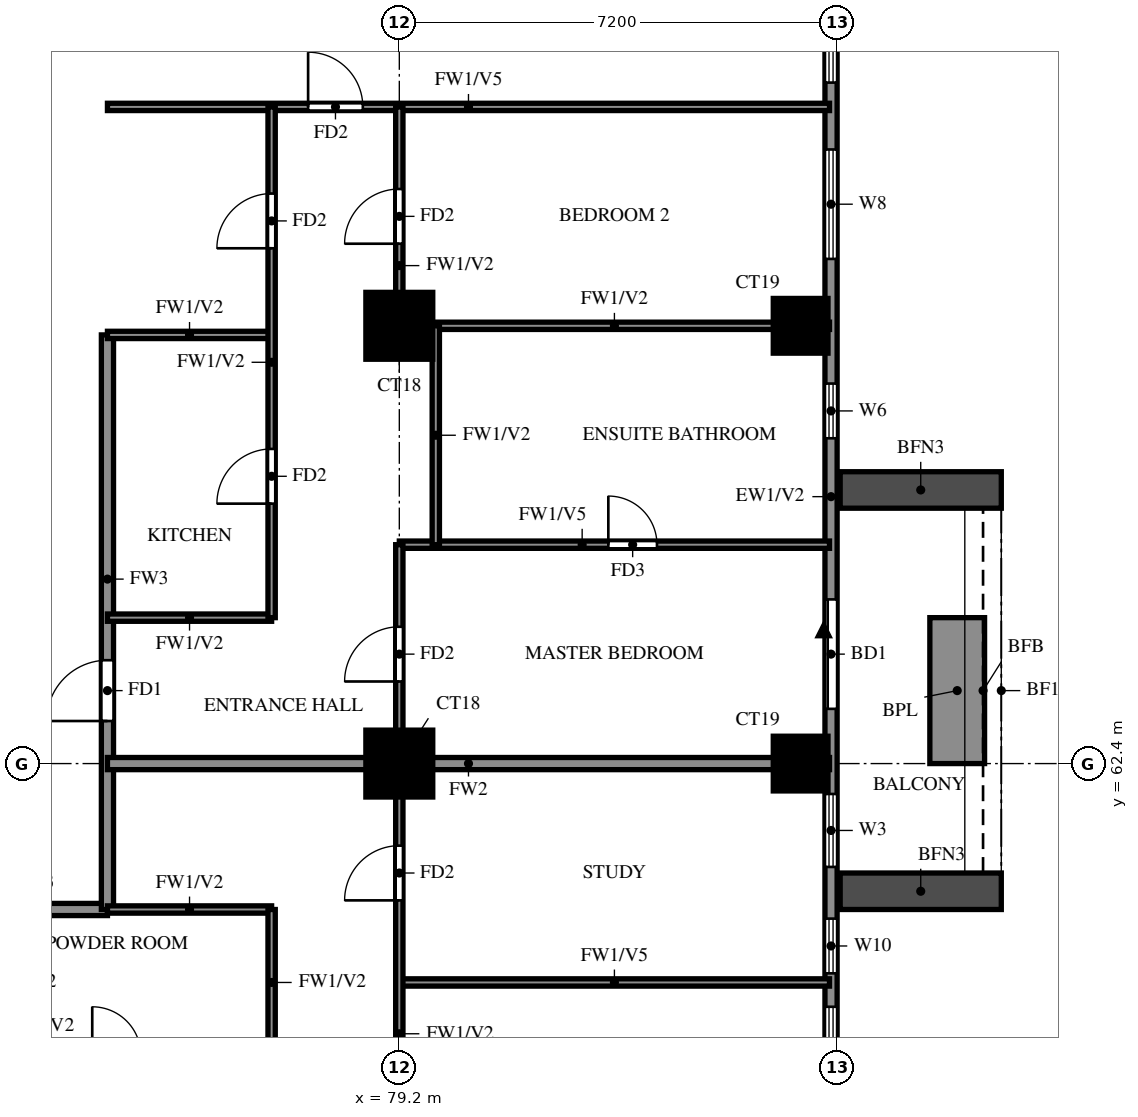
"""IFC4 building model, lengths in metres.
Left out: names, types, materials, properties, quantities, classifications, styles, units other than length and angle.
Written with IfcOpenShell. Run it as: python <this file> out.ifc"""

import sys

from ifc_helpers import new_model, si_unit, direction, frame, frame_2d, origin, origin_2d, place, context, subcontext, project, spatial, rectangle, extrude, source, transform, mapped, element, fill, save


model = new_model("IFC4")
c1 = context("Model", 3, precision=1e-05, world=origin(), true_north=direction((0.0, 1.0)))
c2 = subcontext(c1, "Body", "Model", "MODEL_VIEW")
j1 = project(units=[si_unit("LENGTHUNIT", "METRE"), si_unit("PLANEANGLEUNIT", "RADIAN")], contexts=[c1])
p1 = place(None, origin())
s1 = spatial("IfcSite", under=j1, at=p1, CompositionType="ELEMENT")
p2 = place(p1, origin())
s2 = spatial("IfcBuilding", under=s1, at=p2, CompositionType="ELEMENT")
p3 = place(p2, frame((0.0, 0.0, 130.5)))
s3 = spatial("IfcBuildingStorey", under=s2, at=p3, CompositionType="ELEMENT", Elevation=130.5)
m1 = source(origin(), c2, "Body", "SweptSolid", [
    extrude(rectangle(XDim=1.1, YDim=1.1, at=origin_2d()), origin(), (0.0, 0.0, 1.0), 3.2),
])
p4 = place(p3, frame((79.2, 62.4, 0.0), z_axis=(0.0, 0.0, 1.0), x_axis=(1.0, 0.0, 0.0)))
e1 = element("IfcColumn", 1, at=p4, inside=s3, PredefinedType="COLUMN", context=c2, shape_type="MappedRepresentation", body=[
    mapped(m1, transform((0.0, 0.0, 0.0))),
])
m2 = source(origin(), c2, "Body", "SweptSolid", [
    extrude(rectangle(XDim=0.9, YDim=0.9, at=origin_2d()), origin(), (0.0, 0.0, 1.0), 3.2),
])
p5 = place(p3, frame((85.8, 62.4, 0.0), z_axis=(0.0, 0.0, 1.0), x_axis=(1.0, 0.0, 0.0)))
e2 = element("IfcColumn", 2, at=p5, inside=s3, PredefinedType="COLUMN", context=c2, shape_type="MappedRepresentation", body=[
    mapped(m2, transform((0.0, 0.0, 0.0))),
])
p6 = place(p3, frame((79.2, 69.6, 0.0), z_axis=(0.0, 0.0, 1.0), x_axis=(1.0, 0.0, 0.0)))
e3 = element("IfcColumn", 3, at=p6, inside=s3, PredefinedType="COLUMN", context=c2, shape_type="MappedRepresentation", body=[
    mapped(m1, transform((0.0, 0.0, 0.0))),
])
p7 = place(p3, frame((85.8, 69.6, 0.0), z_axis=(0.0, 0.0, 1.0), x_axis=(1.0, 0.0, 0.0)))
e4 = element("IfcColumn", 4, at=p7, inside=s3, PredefinedType="COLUMN", context=c2, shape_type="MappedRepresentation", body=[
    mapped(m2, transform((0.0, 0.0, 0.0))),
])
p8 = place(p3, frame((86.3, 48.2, 0.0), z_axis=(0.0, 0.0, 1.0), x_axis=(0.0, 1.0, 0.0)))
e5 = element("IfcWall", 5, at=p8, inside=s3, PredefinedType="SOLIDWALL", context=c2, shape_type="SweptSolid", body=[
    extrude(rectangle(XDim=28.6, YDim=0.2, at=frame_2d((14.3, 0.0))), origin(), (0.0, 0.0, 1.0), 3.2),
])
p9 = place(p8, frame((15.1, 0.0, 0.0)))
e6 = element("IfcOpeningElement", 6, at=p9, cuts=e5, PredefinedType="OPENING", context=c2, shape_type="SweptSolid", body=[
    extrude(rectangle(XDim=1.8, YDim=2.4, at=frame_2d((0.9, 1.2))), frame((0.0, 0.11, 0.0), z_axis=(0.0, -1.0, 0.0), x_axis=(1.0, 0.0, 0.0)), (0.0, 0.0, 1.0), 0.22),
])
p10 = place(p8, frame((0.6, 0.0, 0.6)))
e7 = element("IfcOpeningElement", 7, at=p10, cuts=e5, PredefinedType="OPENING", context=c2, shape_type="SweptSolid", body=[
    extrude(rectangle(XDim=2.4, YDim=2.4, at=frame_2d((1.2, 1.2))), frame((0.0, 0.11, 0.0), z_axis=(0.0, -1.0, 0.0), x_axis=(1.0, 0.0, 0.0)), (0.0, 0.0, 1.0), 0.22),
])
p11 = place(p8, frame((3.8, 0.0, 0.6)))
e8 = element("IfcOpeningElement", 8, at=p11, cuts=e5, PredefinedType="OPENING", context=c2, shape_type="SweptSolid", body=[
    extrude(rectangle(XDim=2.4, YDim=2.4, at=frame_2d((1.2, 1.2))), frame((0.0, 0.11, 0.0), z_axis=(0.0, -1.0, 0.0), x_axis=(1.0, 0.0, 0.0)), (0.0, 0.0, 1.0), 0.22),
])
p12 = place(p8, frame((7.8, 0.0, 0.6)))
e9 = element("IfcOpeningElement", 9, at=p12, cuts=e5, PredefinedType="OPENING", context=c2, shape_type="SweptSolid", body=[
    extrude(rectangle(XDim=2.4, YDim=2.4, at=frame_2d((1.2, 1.2))), frame((0.0, 0.11, 0.0), z_axis=(0.0, -1.0, 0.0), x_axis=(1.0, 0.0, 0.0)), (0.0, 0.0, 1.0), 0.22),
])
p13 = place(p8, frame((10.75, 0.0, 0.6)))
e10 = element("IfcOpeningElement", 10, at=p13, cuts=e5, PredefinedType="OPENING", context=c2, shape_type="SweptSolid", body=[
    extrude(rectangle(XDim=0.9, YDim=2.4, at=frame_2d((0.45, 1.2))), frame((0.0, 0.11, 0.0), z_axis=(0.0, -1.0, 0.0), x_axis=(1.0, 0.0, 0.0)), (0.0, 0.0, 1.0), 0.22),
])
p14 = place(p8, frame((12.5, 0.0, 0.6)))
e11 = element("IfcOpeningElement", 11, at=p14, cuts=e5, PredefinedType="OPENING", context=c2, shape_type="SweptSolid", body=[
    extrude(rectangle(XDim=1.2, YDim=2.4, at=frame_2d((0.6, 1.2))), frame((0.0, 0.11, 0.0), z_axis=(0.0, -1.0, 0.0), x_axis=(1.0, 0.0, 0.0)), (0.0, 0.0, 1.0), 0.22),
])
p15 = place(p8, frame((19.55, 0.0, 1.5)))
e12 = element("IfcOpeningElement", 12, at=p15, cuts=e5, PredefinedType="OPENING", context=c2, shape_type="SweptSolid", body=[
    extrude(rectangle(XDim=0.9, YDim=0.9, at=frame_2d((0.45, 0.45))), frame((0.0, 0.11, 0.0), z_axis=(0.0, -1.0, 0.0), x_axis=(1.0, 0.0, 0.0)), (0.0, 0.0, 1.0), 0.22),
])
p16 = place(p8, frame((22.5, 0.0, 0.6)))
e13 = element("IfcOpeningElement", 13, at=p16, cuts=e5, PredefinedType="OPENING", context=c2, shape_type="SweptSolid", body=[
    extrude(rectangle(XDim=1.8, YDim=2.4, at=frame_2d((0.9, 1.2))), frame((0.0, 0.11, 0.0), z_axis=(0.0, -1.0, 0.0), x_axis=(1.0, 0.0, 0.0)), (0.0, 0.0, 1.0), 0.22),
])
p17 = place(p8, frame((25.4, 0.0, 0.6)))
e14 = element("IfcOpeningElement", 14, at=p17, cuts=e5, PredefinedType="OPENING", context=c2, shape_type="SweptSolid", body=[
    extrude(rectangle(XDim=2.4, YDim=2.4, at=frame_2d((1.2, 1.2))), frame((0.0, 0.11, 0.0), z_axis=(0.0, -1.0, 0.0), x_axis=(1.0, 0.0, 0.0)), (0.0, 0.0, 1.0), 0.22),
])
for number, where, z_axis, x_axis in (
    (15, (86.45, 60.3, 0.0), (0.0, 0.0, 1.0), (1.0, 0.0, 0.0)),
    (16, (86.45, 66.9, 0.0), (0.0, 0.0, 1.0), (1.0, 0.0, 0.0)),
):
    element("IfcWall", number, at=place(p3, frame(where, z_axis=z_axis, x_axis=x_axis)), inside=s3, PredefinedType="SOLIDWALL", context=c2, shape_type="SweptSolid", body=[
        extrude(rectangle(XDim=2.65, YDim=0.6, at=frame_2d((1.325, 0.0))), origin(), (0.0, 0.0, 1.0), 2.85),
    ])
p18 = place(p3, frame((88.375, 62.4, 0.0), z_axis=(0.0, 0.0, 1.0), x_axis=(0.0, 1.0, 0.0)))
e17 = element("IfcWall", 17, at=p18, inside=s3, PredefinedType="SOLIDWALL", context=c2, shape_type="SweptSolid", body=[
    extrude(rectangle(XDim=2.4, YDim=0.9, at=frame_2d((1.2, 0.0))), origin(), (0.0, 0.0, 1.0), 0.9),
])
p19 = place(p3, frame((72.0, 60.0, 0.0), z_axis=(0.0, 0.0, 1.0), x_axis=(1.0, 0.0, 0.0)))
e18 = element("IfcWall", 18, at=p19, inside=s3, PredefinedType="SOLIDWALL", context=c2, shape_type="SweptSolid", body=[
    extrude(rectangle(XDim=2.4, YDim=0.2, at=frame_2d((1.2, 0.0))), origin(), (0.0, 0.0, 1.0), 3.2),
])
p20 = place(p3, frame((74.4, 60.0, 0.0), z_axis=(0.0, 0.0, 1.0), x_axis=(0.0, 1.0, 0.0)))
e19 = element("IfcWall", 19, at=p20, inside=s3, PredefinedType="SOLIDWALL", context=c2, shape_type="SweptSolid", body=[
    extrude(rectangle(XDim=9.45, YDim=0.2, at=frame_2d((4.725, 0.0))), origin(), (0.0, 0.0, 1.0), 3.2),
])
p21 = place(p20, frame((3.1, 0.0, 0.0)))
e20 = element("IfcOpeningElement", 20, at=p21, cuts=e19, PredefinedType="OPENING", context=c2, shape_type="SweptSolid", body=[
    extrude(rectangle(XDim=1.0, YDim=2.1, at=frame_2d((0.5, 1.05))), frame((0.0, 0.11, 0.0), z_axis=(0.0, -1.0, 0.0), x_axis=(1.0, 0.0, 0.0)), (0.0, 0.0, 1.0), 0.22),
])
p22 = place(p3, frame((74.4, 62.4, 0.0), z_axis=(0.0, 0.0, 1.0), x_axis=(1.0, 0.0, 0.0)))
e21 = element("IfcWall", 21, at=p22, inside=s3, PredefinedType="SOLIDWALL", context=c2, shape_type="SweptSolid", body=[
    extrude(rectangle(XDim=11.875, YDim=0.2, at=frame_2d((5.938, 0.0))), origin(), (0.0, 0.0, 1.0), 3.2),
])
p23 = place(p3, frame((79.2, 58.8, 0.0), z_axis=(0.0, 0.0, 1.0), x_axis=(1.0, 0.0, 0.0)))
e22 = element("IfcWall", 22, at=p23, inside=s3, PredefinedType="PARTITIONING", context=c2, shape_type="SweptSolid", body=[
    extrude(rectangle(XDim=7.075, YDim=0.12, at=frame_2d((3.538, 0.0))), origin(), (0.0, 0.0, 1.0), 2.3),
])
for number, where, z_axis, x_axis in (
    (23, (74.4, 60.0, 0.0), (0.0, 0.0, 1.0), (1.0, 0.0, 0.0)),
    (24, (74.4, 64.8, 0.0), (0.0, 0.0, 1.0), (1.0, 0.0, 0.0)),
):
    element("IfcWall", number, at=place(p3, frame(where, z_axis=z_axis, x_axis=x_axis)), inside=s3, PredefinedType="PARTITIONING", context=c2, shape_type="SweptSolid", body=[
        extrude(rectangle(XDim=2.7, YDim=0.12, at=frame_2d((1.35, 0.0))), origin(), (0.0, 0.0, 1.0), 3.2),
    ])
p24 = place(p3, frame((79.2, 66.0, 0.0), z_axis=(0.0, 0.0, 1.0), x_axis=(1.0, 0.0, 0.0)))
e25 = element("IfcWall", 25, at=p24, inside=s3, PredefinedType="PARTITIONING", context=c2, shape_type="SweptSolid", body=[
    extrude(rectangle(XDim=7.075, YDim=0.12, at=frame_2d((3.538, 0.0))), origin(), (0.0, 0.0, 1.0), 2.3),
])
p25 = place(p24, frame((3.438, 0.0, 0.0)))
e26 = element("IfcOpeningElement", 26, at=p25, cuts=e25, PredefinedType="OPENING", context=c2, shape_type="SweptSolid", body=[
    extrude(rectangle(XDim=0.8, YDim=2.1, at=frame_2d((0.4, 1.05))), frame((0.0, 0.07, 0.0), z_axis=(0.0, -1.0, 0.0), x_axis=(1.0, 0.0, 0.0)), (0.0, 0.0, 1.0), 0.14),
])
p26 = place(p3, frame((74.4, 69.45, 0.0), z_axis=(0.0, 0.0, 1.0), x_axis=(1.0, 0.0, 0.0)))
e27 = element("IfcWall", 27, at=p26, inside=s3, PredefinedType="PARTITIONING", context=c2, shape_type="SweptSolid", body=[
    extrude(rectangle(XDim=2.7, YDim=0.12, at=frame_2d((1.35, 0.0))), origin(), (0.0, 0.0, 1.0), 3.2),
])
p27 = place(p3, frame((79.2, 69.6, 0.0), z_axis=(0.0, 0.0, 1.0), x_axis=(1.0, 0.0, 0.0)))
e28 = element("IfcWall", 28, at=p27, inside=s3, PredefinedType="PARTITIONING", context=c2, shape_type="SweptSolid", body=[
    extrude(rectangle(XDim=7.075, YDim=0.12, at=frame_2d((3.538, 0.0))), origin(), (0.0, 0.0, 1.0), 3.2),
])
p28 = place(p3, frame((74.4, 73.2, 0.0), z_axis=(0.0, 0.0, 1.0), x_axis=(1.0, 0.0, 0.0)))
e29 = element("IfcWall", 29, at=p28, inside=s3, PredefinedType="PARTITIONING", context=c2, shape_type="SweptSolid", body=[
    extrude(rectangle(XDim=11.875, YDim=0.12, at=frame_2d((5.938, 0.0))), origin(), (0.0, 0.0, 1.0), 2.3),
])
p29 = place(p28, frame((3.3, 0.0, 0.0)))
e30 = element("IfcOpeningElement", 30, at=p29, cuts=e29, PredefinedType="OPENING", context=c2, shape_type="SweptSolid", body=[
    extrude(rectangle(XDim=0.9, YDim=2.1, at=frame_2d((0.45, 1.05))), frame((0.0, 0.07, 0.0), z_axis=(0.0, -1.0, 0.0), x_axis=(1.0, 0.0, 0.0)), (0.0, 0.0, 1.0), 0.14),
])
p30 = place(p3, frame((77.1, 57.6, 0.0), z_axis=(0.0, 0.0, 1.0), x_axis=(0.0, 1.0, 0.0)))
e31 = element("IfcWall", 31, at=p30, inside=s3, PredefinedType="PARTITIONING", context=c2, shape_type="SweptSolid", body=[
    extrude(rectangle(XDim=2.4, YDim=0.12, at=frame_2d((1.2, 0.0))), origin(), (0.0, 0.0, 1.0), 3.2),
])
p31 = place(p3, frame((77.1, 64.8, 0.0), z_axis=(0.0, 0.0, 1.0), x_axis=(0.0, 1.0, 0.0)))
e32 = element("IfcWall", 32, at=p31, inside=s3, PredefinedType="PARTITIONING", context=c2, shape_type="SweptSolid", body=[
    extrude(rectangle(XDim=8.4, YDim=0.12, at=frame_2d((4.2, 0.0))), origin(), (0.0, 0.0, 1.0), 3.2),
])
p32 = place(p31, frame((1.875, 0.0, 0.0)))
e33 = element("IfcOpeningElement", 33, at=p32, cuts=e32, PredefinedType="OPENING", context=c2, shape_type="SweptSolid", body=[
    extrude(rectangle(XDim=0.9, YDim=2.1, at=frame_2d((0.45, 1.05))), frame((0.0, 0.07, 0.0), z_axis=(0.0, -1.0, 0.0), x_axis=(1.0, 0.0, 0.0)), (0.0, 0.0, 1.0), 0.14),
])
p33 = place(p31, frame((6.075, 0.0, 0.0)))
e34 = element("IfcOpeningElement", 34, at=p33, cuts=e32, PredefinedType="OPENING", context=c2, shape_type="SweptSolid", body=[
    extrude(rectangle(XDim=0.9, YDim=2.1, at=frame_2d((0.45, 1.05))), frame((0.0, 0.07, 0.0), z_axis=(0.0, -1.0, 0.0), x_axis=(1.0, 0.0, 0.0)), (0.0, 0.0, 1.0), 0.14),
])
p34 = place(p3, frame((79.2, 48.125, 0.0), z_axis=(0.0, 0.0, 1.0), x_axis=(0.0, 1.0, 0.0)))
e35 = element("IfcWall", 35, at=p34, inside=s3, PredefinedType="PARTITIONING", context=c2, shape_type="SweptSolid", body=[
    extrude(rectangle(XDim=17.875, YDim=0.12, at=frame_2d((8.938, 0.0))), origin(), (0.0, 0.0, 1.0), 3.2),
])
p35 = place(p34, frame((1.288, 0.0, 0.0)))
e36 = element("IfcOpeningElement", 36, at=p35, cuts=e35, PredefinedType="OPENING", context=c2, shape_type="SweptSolid", body=[
    extrude(rectangle(XDim=0.9, YDim=2.1, at=frame_2d((0.45, 1.05))), frame((0.0, 0.07, 0.0), z_axis=(0.0, -1.0, 0.0), x_axis=(1.0, 0.0, 0.0)), (0.0, 0.0, 1.0), 0.14),
])
p36 = place(p34, frame((7.825, 0.0, 0.0)))
e37 = element("IfcOpeningElement", 37, at=p36, cuts=e35, PredefinedType="OPENING", context=c2, shape_type="SweptSolid", body=[
    extrude(rectangle(XDim=1.5, YDim=2.1, at=frame_2d((0.75, 1.05))), frame((0.0, 0.07, 0.0), z_axis=(0.0, -1.0, 0.0), x_axis=(1.0, 0.0, 0.0)), (0.0, 0.0, 1.0), 0.14),
])
p37 = place(p34, frame((12.025, 0.0, 0.0)))
e38 = element("IfcOpeningElement", 38, at=p37, cuts=e35, PredefinedType="OPENING", context=c2, shape_type="SweptSolid", body=[
    extrude(rectangle(XDim=0.9, YDim=2.1, at=frame_2d((0.45, 1.05))), frame((0.0, 0.07, 0.0), z_axis=(0.0, -1.0, 0.0), x_axis=(1.0, 0.0, 0.0)), (0.0, 0.0, 1.0), 0.14),
])
p38 = place(p34, frame((15.625, 0.0, 0.0)))
e39 = element("IfcOpeningElement", 39, at=p38, cuts=e35, PredefinedType="OPENING", context=c2, shape_type="SweptSolid", body=[
    extrude(rectangle(XDim=0.9, YDim=2.1, at=frame_2d((0.45, 1.05))), frame((0.0, 0.07, 0.0), z_axis=(0.0, -1.0, 0.0), x_axis=(1.0, 0.0, 0.0)), (0.0, 0.0, 1.0), 0.14),
])
p39 = place(p3, frame((79.2, 69.6, 0.0), z_axis=(0.0, 0.0, 1.0), x_axis=(0.0, 1.0, 0.0)))
e40 = element("IfcWall", 40, at=p39, inside=s3, PredefinedType="PARTITIONING", context=c2, shape_type="SweptSolid", body=[
    extrude(rectangle(XDim=3.6, YDim=0.12, at=frame_2d((1.8, 0.0))), origin(), (0.0, 0.0, 1.0), 3.2),
])
p40 = place(p39, frame((1.35, 0.0, 0.0)))
e41 = element("IfcOpeningElement", 41, at=p40, cuts=e40, PredefinedType="OPENING", context=c2, shape_type="SweptSolid", body=[
    extrude(rectangle(XDim=0.9, YDim=2.1, at=frame_2d((0.45, 1.05))), frame((0.0, 0.07, 0.0), z_axis=(0.0, -1.0, 0.0), x_axis=(1.0, 0.0, 0.0)), (0.0, 0.0, 1.0), 0.14),
])
p41 = place(p3, frame((79.8, 66.0, 0.0), z_axis=(0.0, 0.0, 1.0), x_axis=(0.0, 1.0, 0.0)))
e42 = element("IfcWall", 42, at=p41, inside=s3, PredefinedType="PARTITIONING", context=c2, shape_type="SweptSolid", body=[
    extrude(rectangle(XDim=3.6, YDim=0.12, at=frame_2d((1.8, 0.0))), origin(), (0.0, 0.0, 1.0), 3.2),
])
p42 = place(p9, origin())
e43 = element("IfcDoor", 43, at=p42, inside=s3, OperationType="DOUBLE_DOOR_SLIDING", PredefinedType="DOOR", context=c2, shape_type="SweptSolid", body=[
    extrude(rectangle(XDim=1.8, YDim=2.4, at=frame_2d((0.9, 1.2))), frame((0.0, 0.025, 0.0), z_axis=(0.0, -1.0, 0.0), x_axis=(1.0, 0.0, 0.0)), (0.0, 0.0, 1.0), 0.05),
])
fill(e6, e43)
p43 = place(p12, origin())
e44 = element("IfcWindow", 44, at=p43, inside=s3, PartitioningType="DOUBLE_PANEL_VERTICAL", PredefinedType="WINDOW", context=c2, shape_type="SweptSolid", body=[
    extrude(rectangle(XDim=2.4, YDim=2.4, at=frame_2d((1.2, 1.2))), frame((0.0, 0.03, 0.0), z_axis=(0.0, -1.0, 0.0), x_axis=(1.0, 0.0, 0.0)), (0.0, 0.0, 1.0), 0.06),
])
fill(e9, e44)
p44 = place(p13, origin())
e45 = element("IfcWindow", 45, at=p44, inside=s3, PartitioningType="SINGLE_PANEL", PredefinedType="WINDOW", context=c2, shape_type="SweptSolid", body=[
    extrude(rectangle(XDim=0.9, YDim=2.4, at=frame_2d((0.45, 1.2))), frame((0.0, 0.03, 0.0), z_axis=(0.0, -1.0, 0.0), x_axis=(1.0, 0.0, 0.0)), (0.0, 0.0, 1.0), 0.06),
])
fill(e10, e45)
p45 = place(p14, origin())
e46 = element("IfcWindow", 46, at=p45, inside=s3, PartitioningType="SINGLE_PANEL", PredefinedType="WINDOW", context=c2, shape_type="SweptSolid", body=[
    extrude(rectangle(XDim=1.2, YDim=2.4, at=frame_2d((0.6, 1.2))), frame((0.0, 0.03, 0.0), z_axis=(0.0, -1.0, 0.0), x_axis=(1.0, 0.0, 0.0)), (0.0, 0.0, 1.0), 0.06),
])
fill(e11, e46)
p46 = place(p15, origin())
e47 = element("IfcWindow", 47, at=p46, inside=s3, PartitioningType="SINGLE_PANEL", PredefinedType="WINDOW", context=c2, shape_type="SweptSolid", body=[
    extrude(rectangle(XDim=0.9, YDim=0.9, at=frame_2d((0.45, 0.45))), frame((0.0, 0.03, 0.0), z_axis=(0.0, -1.0, 0.0), x_axis=(1.0, 0.0, 0.0)), (0.0, 0.0, 1.0), 0.06),
])
fill(e12, e47)
p47 = place(p16, origin())
e48 = element("IfcWindow", 48, at=p47, inside=s3, PartitioningType="DOUBLE_PANEL_VERTICAL", PredefinedType="WINDOW", context=c2, shape_type="SweptSolid", body=[
    extrude(rectangle(XDim=1.8, YDim=2.4, at=frame_2d((0.9, 1.2))), frame((0.0, 0.03, 0.0), z_axis=(0.0, -1.0, 0.0), x_axis=(1.0, 0.0, 0.0)), (0.0, 0.0, 1.0), 0.06),
])
fill(e13, e48)
p48 = place(p17, origin())
e49 = element("IfcWindow", 49, at=p48, inside=s3, PartitioningType="DOUBLE_PANEL_VERTICAL", PredefinedType="WINDOW", context=c2, shape_type="SweptSolid", body=[
    extrude(rectangle(XDim=2.4, YDim=2.4, at=frame_2d((1.2, 1.2))), frame((0.0, 0.03, 0.0), z_axis=(0.0, -1.0, 0.0), x_axis=(1.0, 0.0, 0.0)), (0.0, 0.0, 1.0), 0.06),
])
fill(e14, e49)
p49 = place(p37, origin())
e50 = element("IfcDoor", 50, at=p49, inside=s3, OperationType="SINGLE_SWING_LEFT", PredefinedType="DOOR", context=c2, shape_type="SweptSolid", body=[
    extrude(rectangle(XDim=0.9, YDim=2.1, at=frame_2d((0.45, 1.05))), frame((0.0, 0.025, 0.0), z_axis=(0.0, -1.0, 0.0), x_axis=(1.0, 0.0, 0.0)), (0.0, 0.0, 1.0), 0.05),
])
fill(e38, e50)
p50 = place(p21, origin())
e51 = element("IfcDoor", 51, at=p50, inside=s3, OperationType="SINGLE_SWING_LEFT", PredefinedType="DOOR", context=c2, shape_type="SweptSolid", body=[
    extrude(rectangle(XDim=1.0, YDim=2.1, at=frame_2d((0.5, 1.05))), frame((0.0, 0.025, 0.0), z_axis=(0.0, -1.0, 0.0), x_axis=(1.0, 0.0, 0.0)), (0.0, 0.0, 1.0), 0.05),
])
fill(e20, e51)
p51 = place(p38, origin())
e52 = element("IfcDoor", 52, at=p51, inside=s3, OperationType="SINGLE_SWING_RIGHT", PredefinedType="DOOR", context=c2, shape_type="SweptSolid", body=[
    extrude(rectangle(XDim=0.9, YDim=2.1, at=frame_2d((0.45, 1.05))), frame((0.0, 0.025, 0.0), z_axis=(0.0, -1.0, 0.0), x_axis=(1.0, 0.0, 0.0)), (0.0, 0.0, 1.0), 0.05),
])
fill(e39, e52)
p52 = place(p25, origin())
e53 = element("IfcDoor", 53, at=p52, inside=s3, OperationType="SINGLE_SWING_LEFT", PredefinedType="DOOR", context=c2, shape_type="SweptSolid", body=[
    extrude(rectangle(XDim=0.8, YDim=2.1, at=frame_2d((0.4, 1.05))), frame((0.0, 0.025, 0.0), z_axis=(0.0, -1.0, 0.0), x_axis=(1.0, 0.0, 0.0)), (0.0, 0.0, 1.0), 0.05),
])
fill(e26, e53)
p53 = place(p40, origin())
e54 = element("IfcDoor", 54, at=p53, inside=s3, OperationType="SINGLE_SWING_LEFT", PredefinedType="DOOR", context=c2, shape_type="SweptSolid", body=[
    extrude(rectangle(XDim=0.9, YDim=2.1, at=frame_2d((0.45, 1.05))), frame((0.0, 0.025, 0.0), z_axis=(0.0, -1.0, 0.0), x_axis=(1.0, 0.0, 0.0)), (0.0, 0.0, 1.0), 0.05),
])
fill(e41, e54)
p54 = place(p29, origin())
e55 = element("IfcDoor", 55, at=p54, inside=s3, OperationType="SINGLE_SWING_RIGHT", PredefinedType="DOOR", context=c2, shape_type="SweptSolid", body=[
    extrude(rectangle(XDim=0.9, YDim=2.1, at=frame_2d((0.45, 1.05))), frame((0.0, 0.025, 0.0), z_axis=(0.0, -1.0, 0.0), x_axis=(1.0, 0.0, 0.0)), (0.0, 0.0, 1.0), 0.05),
])
fill(e30, e55)
p55 = place(p32, origin())
e56 = element("IfcDoor", 56, at=p55, inside=s3, OperationType="SINGLE_SWING_LEFT", PredefinedType="DOOR", context=c2, shape_type="SweptSolid", body=[
    extrude(rectangle(XDim=0.9, YDim=2.1, at=frame_2d((0.45, 1.05))), frame((0.0, 0.025, 0.0), z_axis=(0.0, -1.0, 0.0), x_axis=(1.0, 0.0, 0.0)), (0.0, 0.0, 1.0), 0.05),
])
fill(e33, e56)
p56 = place(p33, origin())
e57 = element("IfcDoor", 57, at=p56, inside=s3, OperationType="SINGLE_SWING_LEFT", PredefinedType="DOOR", context=c2, shape_type="SweptSolid", body=[
    extrude(rectangle(XDim=0.9, YDim=2.1, at=frame_2d((0.45, 1.05))), frame((0.0, 0.025, 0.0), z_axis=(0.0, -1.0, 0.0), x_axis=(1.0, 0.0, 0.0)), (0.0, 0.0, 1.0), 0.05),
])
fill(e34, e57)
save(model, sys.argv[1])
